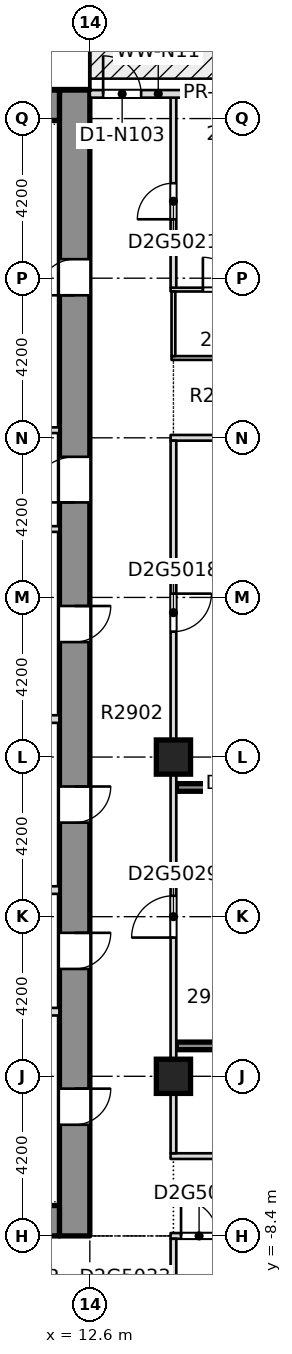
"""IFC4 building model, lengths in metres.
Left out: names, types, materials, properties, quantities, classifications, styles, units other than length and angle.
Written with IfcOpenShell. Run it as: python <this file> out.ifc"""

import sys

from ifc_helpers import new_model, si_unit, direction, frame, frame_2d, origin, origin_2d, place, context, subcontext, project, spatial, rectangle, extrude, element, fill, save


model = new_model("IFC4")
c1 = context("Model", 3, precision=1e-05, world=origin(), true_north=direction((0.0, 1.0)))
c2 = subcontext(c1, "Body", "Model", "MODEL_VIEW")
j1 = project(units=[si_unit("LENGTHUNIT", "METRE"), si_unit("PLANEANGLEUNIT", "RADIAN")], contexts=[c1])
p1 = place(None, origin())
s1 = spatial("IfcSite", under=j1, at=p1, CompositionType="ELEMENT")
p2 = place(p1, origin())
s2 = spatial("IfcBuilding", under=s1, at=p2, CompositionType="ELEMENT")
p3 = place(p2, frame((0.0, 0.0, 114.9)))
s3 = spatial("IfcBuildingStorey", under=s2, at=p3, CompositionType="ELEMENT", Elevation=114.9)
p4 = place(p3, frame((12.2, -8.4, -0.32), z_axis=(0.0, 0.0, 1.0), x_axis=(0.0, 1.0, 0.0)))
e1 = element("IfcWall", 1, at=p4, inside=s3, PredefinedType="SHEAR", context=c2, shape_type="SweptSolid", body=[
    extrude(rectangle(XDim=30.15, YDim=0.8, at=frame_2d((15.075, 0.0))), origin(), (0.0, 0.0, 1.0), 3.45),
])
p5 = place(p4, frame((2.925, 0.0, 0.32)))
e2 = element("IfcOpeningElement", 2, at=p5, cuts=e1, PredefinedType="OPENING", context=c2, shape_type="SweptSolid", body=[
    extrude(rectangle(XDim=0.95, YDim=2.1, at=frame_2d((0.475, 1.05))), frame((0.0, 0.41, 0.0), z_axis=(0.0, -1.0, 0.0), x_axis=(1.0, 0.0, 0.0)), (0.0, 0.0, 1.0), 0.82),
])
p6 = place(p4, frame((7.025, 0.0, 0.32)))
e3 = element("IfcOpeningElement", 3, at=p6, cuts=e1, PredefinedType="OPENING", context=c2, shape_type="SweptSolid", body=[
    extrude(rectangle(XDim=0.95, YDim=2.1, at=frame_2d((0.475, 1.05))), frame((0.0, 0.41, 0.0), z_axis=(0.0, -1.0, 0.0), x_axis=(1.0, 0.0, 0.0)), (0.0, 0.0, 1.0), 0.82),
])
p7 = place(p4, frame((10.875, 0.0, 0.32)))
e4 = element("IfcOpeningElement", 4, at=p7, cuts=e1, PredefinedType="OPENING", context=c2, shape_type="SweptSolid", body=[
    extrude(rectangle(XDim=0.95, YDim=2.1, at=frame_2d((0.475, 1.05))), frame((0.0, 0.41, 0.0), z_axis=(0.0, -1.0, 0.0), x_axis=(1.0, 0.0, 0.0)), (0.0, 0.0, 1.0), 0.82),
])
p8 = place(p4, frame((15.625, 0.0, 0.32)))
e5 = element("IfcOpeningElement", 5, at=p8, cuts=e1, PredefinedType="OPENING", context=c2, shape_type="SweptSolid", body=[
    extrude(rectangle(XDim=0.95, YDim=2.1, at=frame_2d((0.475, 1.05))), frame((0.0, 0.41, 0.0), z_axis=(0.0, -1.0, 0.0), x_axis=(1.0, 0.0, 0.0)), (0.0, 0.0, 1.0), 0.82),
])
p9 = place(p4, frame((24.75, 0.0, 0.32)))
e6 = element("IfcOpeningElement", 6, at=p9, cuts=e1, PredefinedType="OPENING", context=c2, shape_type="SweptSolid", body=[
    extrude(rectangle(XDim=0.95, YDim=2.1, at=frame_2d((0.475, 1.05))), frame((0.0, 0.41, 0.0), z_axis=(0.0, -1.0, 0.0), x_axis=(1.0, 0.0, 0.0)), (0.0, 0.0, 1.0), 0.82),
])
p10 = place(p4, frame((19.3, 0.0, 0.32)))
e7 = element("IfcOpeningElement", 7, at=p10, cuts=e1, PredefinedType="OPENING", context=c2, shape_type="SweptSolid", body=[
    extrude(rectangle(XDim=1.2, YDim=2.1, at=frame_2d((0.6, 1.05))), frame((0.0, 0.41, 0.0), z_axis=(0.0, -1.0, 0.0), x_axis=(1.0, 0.0, 0.0)), (0.0, 0.0, 1.0), 0.82),
])
p11 = place(p3, frame((-11.8, -8.0, -0.32), z_axis=(0.0, 0.0, 1.0), x_axis=(1.0, 0.0, 0.0)))
e8 = element("IfcWall", 8, at=p11, inside=s3, PredefinedType="SHEAR", context=c2, shape_type="SweptSolid", body=[
    extrude(rectangle(XDim=23.6, YDim=0.8, at=frame_2d((11.8, 0.0))), origin(), (0.0, 0.0, 1.0), 3.45),
])
p12 = place(p11, frame((7.05, 0.0, 0.32)))
e9 = element("IfcOpeningElement", 9, at=p12, cuts=e8, PredefinedType="OPENING", context=c2, shape_type="SweptSolid", body=[
    extrude(rectangle(XDim=1.8, YDim=2.1, at=frame_2d((0.9, 1.05))), frame((0.0, 0.41, 0.0), z_axis=(0.0, -1.0, 0.0), x_axis=(1.0, 0.0, 0.0)), (0.0, 0.0, 1.0), 0.82),
])
p13 = place(p11, frame((14.75, 0.0, 0.32)))
e10 = element("IfcOpeningElement", 10, at=p13, cuts=e8, PredefinedType="OPENING", context=c2, shape_type="SweptSolid", body=[
    extrude(rectangle(XDim=1.8, YDim=2.1, at=frame_2d((0.9, 1.05))), frame((0.0, 0.41, 0.0), z_axis=(0.0, -1.0, 0.0), x_axis=(1.0, 0.0, 0.0)), (0.0, 0.0, 1.0), 0.82),
])
p14 = place(p3, frame((-11.8, 21.35, -0.32), z_axis=(0.0, 0.0, 1.0), x_axis=(1.0, 0.0, 0.0)))
e11 = element("IfcWall", 11, at=p14, inside=s3, PredefinedType="SHEAR", context=c2, shape_type="SweptSolid", body=[
    extrude(rectangle(XDim=23.6, YDim=0.8, at=frame_2d((11.8, 0.0))), origin(), (0.0, 0.0, 1.0), 3.45),
])
for number, where, z_axis, x_axis in (
    (12, (14.8, -4.2, -0.32), (0.0, 0.0, 1.0), (1.0, 0.0, 0.0)),
    (13, (14.8, 4.2, -0.32), (0.0, 0.0, 1.0), (1.0, 0.0, 0.0)),
):
    element("IfcColumn", number, at=place(p3, frame(where, z_axis=z_axis, x_axis=x_axis)), inside=s3, PredefinedType="COLUMN", context=c2, shape_type="SweptSolid", body=[
        extrude(rectangle(XDim=0.9, YDim=0.9, at=origin_2d()), origin(), (0.0, 0.0, 1.0), 3.45),
    ])
p15 = place(p3, frame((14.725, -8.4, 0.0), z_axis=(0.0, 0.0, 1.0), x_axis=(1.0, 0.0, 0.0)))
e14 = element("IfcWall", 14, at=p15, inside=s3, PredefinedType="PARTITIONING", context=c2, shape_type="SweptSolid", body=[
    extrude(rectangle(XDim=11.025, YDim=0.15, at=frame_2d((5.512, 0.0))), origin(), (0.0, 0.0, 1.0), 3.13),
])
p16 = place(p15, frame((0.275, 0.0, 0.0)))
e15 = element("IfcOpeningElement", 15, at=p16, cuts=e14, PredefinedType="OPENING", context=c2, shape_type="SweptSolid", body=[
    extrude(rectangle(XDim=0.95, YDim=2.1, at=frame_2d((0.475, 1.05))), frame((0.0, 0.085, 0.0), z_axis=(0.0, -1.0, 0.0), x_axis=(1.0, 0.0, 0.0)), (0.0, 0.0, 1.0), 0.17),
])
p17 = place(p3, frame((14.725, -6.3, 0.0), z_axis=(0.0, 0.0, 1.0), x_axis=(1.0, 0.0, 0.0)))
e16 = element("IfcWall", 16, at=p17, inside=s3, PredefinedType="PARTITIONING", context=c2, shape_type="SweptSolid", body=[
    extrude(rectangle(XDim=11.025, YDim=0.15, at=frame_2d((5.512, 0.0))), origin(), (0.0, 0.0, 1.0), 3.13),
])
p18 = place(p17, frame((5.15, 0.0, 0.0)))
e17 = element("IfcOpeningElement", 17, at=p18, cuts=e16, PredefinedType="OPENING", context=c2, shape_type="SweptSolid", body=[
    extrude(rectangle(XDim=1.0, YDim=2.1, at=frame_2d((0.5, 1.05))), frame((0.0, 0.085, 0.0), z_axis=(0.0, -1.0, 0.0), x_axis=(1.0, 0.0, 0.0)), (0.0, 0.0, 1.0), 0.17),
])
p19 = place(p3, frame((14.875, 3.4, 0.0), z_axis=(0.0, 0.0, 1.0), x_axis=(1.0, 0.0, 0.0)))
e18 = element("IfcWall", 18, at=p19, inside=s3, PredefinedType="SOLIDWALL", context=c2, shape_type="SweptSolid", body=[
    extrude(rectangle(XDim=5.575, YDim=0.2, at=frame_2d((2.788, 0.0))), origin(), (0.0, 0.0, 1.0), 3.13),
])
p20 = place(p3, frame((14.725, 12.6, 0.0), z_axis=(0.0, 0.0, 1.0), x_axis=(1.0, 0.0, 0.0)))
e19 = element("IfcWall", 19, at=p20, inside=s3, PredefinedType="PARTITIONING", context=c2, shape_type="SweptSolid", body=[
    extrude(rectangle(XDim=2.675, YDim=0.15, at=frame_2d((1.337, 0.0))), origin(), (0.0, 0.0, 1.0), 3.13),
])
p21 = place(p3, frame((14.75, 14.7, 0.0), z_axis=(0.0, 0.0, 1.0), x_axis=(1.0, 0.0, 0.0)))
e20 = element("IfcWall", 20, at=p21, inside=s3, PredefinedType="PARTITIONING", context=c2, shape_type="SweptSolid", body=[
    extrude(rectangle(XDim=2.5, YDim=0.1, at=frame_2d((1.25, 0.0))), origin(), (0.0, 0.0, 1.0), 3.13),
])
p22 = place(p3, frame((14.725, 16.5, 0.0), z_axis=(0.0, 0.0, 1.0), x_axis=(1.0, 0.0, 0.0)))
e21 = element("IfcWall", 21, at=p22, inside=s3, PredefinedType="PARTITIONING", context=c2, shape_type="SweptSolid", body=[
    extrude(rectangle(XDim=2.525, YDim=0.1, at=frame_2d((1.262, 0.0))), origin(), (0.0, 0.0, 1.0), 3.13),
])
p23 = place(p22, frame((0.85, 0.0, 0.0)))
e22 = element("IfcOpeningElement", 22, at=p23, cuts=e21, PredefinedType="OPENING", context=c2, shape_type="SweptSolid", body=[
    extrude(rectangle(XDim=0.85, YDim=2.1, at=frame_2d((0.425, 1.05))), frame((0.0, 0.06, 0.0), z_axis=(0.0, -1.0, 0.0), x_axis=(1.0, 0.0, 0.0)), (0.0, 0.0, 1.0), 0.12),
])
p24 = place(p3, frame((14.8, -10.525, 0.0), z_axis=(0.0, 0.0, 1.0), x_axis=(0.0, 1.0, 0.0)))
e23 = element("IfcWall", 23, at=p24, inside=s3, PredefinedType="PARTITIONING", context=c2, shape_type="SweptSolid", body=[
    extrude(rectangle(XDim=2.05, YDim=0.15, at=frame_2d((1.025, 0.0))), origin(), (0.0, 0.0, 1.0), 3.13),
])
p25 = place(p3, frame((14.8, -6.225, 0.0), z_axis=(0.0, 0.0, 1.0), x_axis=(0.0, 1.0, 0.0)))
e24 = element("IfcWall", 24, at=p25, inside=s3, PredefinedType="PARTITIONING", context=c2, shape_type="SweptSolid", body=[
    extrude(rectangle(XDim=18.75, YDim=0.15, at=frame_2d((9.375, 0.0))), origin(), (0.0, 0.0, 1.0), 3.13),
])
p26 = place(p25, frame((13.725, 0.0, 0.0)))
e25 = element("IfcOpeningElement", 25, at=p26, cuts=e24, PredefinedType="OPENING", context=c2, shape_type="SweptSolid", body=[
    extrude(rectangle(XDim=1.0, YDim=2.1, at=frame_2d((0.5, 1.05))), frame((0.0, 0.085, 0.0), z_axis=(0.0, -1.0, 0.0), x_axis=(1.0, 0.0, 0.0)), (0.0, 0.0, 1.0), 0.17),
])
p27 = place(p25, frame((5.675, 0.0, 0.0)))
e26 = element("IfcOpeningElement", 26, at=p27, cuts=e24, PredefinedType="OPENING", context=c2, shape_type="SweptSolid", body=[
    extrude(rectangle(XDim=1.1, YDim=2.1, at=frame_2d((0.55, 1.05))), frame((0.0, 0.085, 0.0), z_axis=(0.0, -1.0, 0.0), x_axis=(1.0, 0.0, 0.0)), (0.0, 0.0, 1.0), 0.17),
])
p28 = place(p3, frame((14.8, 14.75, 0.0), z_axis=(0.0, 0.0, 1.0), x_axis=(0.0, 1.0, 0.0)))
e27 = element("IfcWall", 27, at=p28, inside=s3, PredefinedType="PARTITIONING", context=c2, shape_type="SweptSolid", body=[
    extrude(rectangle(XDim=1.7, YDim=0.1, at=frame_2d((0.85, 0.0))), origin(), (0.0, 0.0, 1.0), 3.13),
])
p29 = place(p3, frame((14.8, 16.55, 0.0), z_axis=(0.0, 0.0, 1.0), x_axis=(0.0, 1.0, 0.0)))
e28 = element("IfcWall", 28, at=p29, inside=s3, PredefinedType="PARTITIONING", context=c2, shape_type="SweptSolid", body=[
    extrude(rectangle(XDim=5.0, YDim=0.15, at=frame_2d((2.5, 0.0))), origin(), (0.0, 0.0, 1.0), 3.13),
])
p30 = place(p29, frame((1.8, 0.0, 0.0)))
e29 = element("IfcOpeningElement", 29, at=p30, cuts=e28, PredefinedType="OPENING", context=c2, shape_type="SweptSolid", body=[
    extrude(rectangle(XDim=0.95, YDim=2.1, at=frame_2d((0.475, 1.05))), frame((0.0, 0.085, 0.0), z_axis=(0.0, -1.0, 0.0), x_axis=(1.0, 0.0, 0.0)), (0.0, 0.0, 1.0), 0.17),
])
p31 = place(p3, frame((16.2, 21.65, 0.0), z_axis=(0.0, 0.0, 1.0), x_axis=(-1.0, 0.0, 0.0)))
e30 = element("IfcWall", 30, at=p31, inside=s3, PredefinedType="STANDARD", context=c2, shape_type="SweptSolid", body=[
    extrude(rectangle(XDim=3.6, YDim=0.2, at=frame_2d((1.8, 0.0))), origin(), (0.0, 0.0, 1.0), 3.13),
])
p32 = place(p31, frame((2.25, 0.0, 0.0)))
e31 = element("IfcOpeningElement", 31, at=p32, cuts=e30, PredefinedType="OPENING", context=c2, shape_type="SweptSolid", body=[
    extrude(rectangle(XDim=1.0, YDim=2.4, at=frame_2d((0.5, 1.2))), frame((0.0, 0.11, 0.0), z_axis=(0.0, -1.0, 0.0), x_axis=(1.0, 0.0, 0.0)), (0.0, 0.0, 1.0), 0.22),
])
for number, where, z_axis, x_axis in (
    (32, (8.801, -2.5, 0.0), (0.0, 0.0, 1.0), (1.0, 0.0, 0.0)),
    (33, (8.801, 0.7, 0.0), (0.0, 0.0, 1.0), (1.0, 0.0, 0.0)),
    (34, (8.801, 5.2, 0.0), (0.0, 0.0, 1.0), (1.0, 0.0, 0.0)),
):
    element("IfcWall", number, at=place(p3, frame(where, z_axis=z_axis, x_axis=x_axis)), inside=s3, PredefinedType="PARTITIONING", context=c2, shape_type="SweptSolid", body=[
        extrude(rectangle(XDim=2.998, YDim=0.2, at=frame_2d((1.499, 0.0))), origin(), (0.0, 0.0, 1.0), 3.13),
    ])
for number, where, z_axis, x_axis in (
    (35, (8.801, 10.2, 0.0), (0.0, 0.0, 1.0), (1.0, 0.0, 0.0)),
    (36, (8.801, 12.8, 0.0), (0.0, 0.0, 1.0), (1.0, 0.0, 0.0)),
):
    element("IfcWall", number, at=place(p3, frame(where, z_axis=z_axis, x_axis=x_axis)), inside=s3, PredefinedType="PARTITIONING", context=c2, shape_type="SweptSolid", body=[
        extrude(rectangle(XDim=2.998, YDim=0.15, at=frame_2d((1.499, 0.0))), origin(), (0.0, 0.0, 1.0), 3.13),
    ])
p33 = place(p3, frame((14.875, -3.4, 0.0), z_axis=(0.0, 0.0, 1.0), x_axis=(1.0, 0.0, 0.0)))
e37 = element("IfcWall", 37, at=p33, inside=s3, PredefinedType="SOLIDWALL", context=c2, shape_type="SweptSolid", body=[
    extrude(rectangle(XDim=5.525, YDim=0.2, at=frame_2d((2.762, 0.0))), origin(), (0.0, 0.0, 1.0), 3.13),
])
p34 = place(p16, origin())
e38 = element("IfcDoor", 38, at=p34, inside=s3, OperationType="SINGLE_SWING_RIGHT", PredefinedType="DOOR", context=c2, shape_type="SweptSolid", body=[
    extrude(rectangle(XDim=0.95, YDim=2.1, at=frame_2d((0.475, 1.05))), frame((0.0, 0.025, 0.0), z_axis=(0.0, -1.0, 0.0), x_axis=(1.0, 0.0, 0.0)), (0.0, 0.0, 1.0), 0.05),
])
fill(e15, e38)
p35 = place(p26, origin())
e39 = element("IfcDoor", 39, at=p35, inside=s3, OperationType="SINGLE_SWING_RIGHT", PredefinedType="DOOR", context=c2, shape_type="SweptSolid", body=[
    extrude(rectangle(XDim=1.0, YDim=2.1, at=frame_2d((0.5, 1.05))), frame((0.0, 0.025, 0.0), z_axis=(0.0, -1.0, 0.0), x_axis=(1.0, 0.0, 0.0)), (0.0, 0.0, 1.0), 0.05),
])
fill(e25, e39)
p36 = place(p30, origin())
e40 = element("IfcDoor", 40, at=p36, inside=s3, OperationType="SINGLE_SWING_LEFT", PredefinedType="DOOR", context=c2, shape_type="SweptSolid", body=[
    extrude(rectangle(XDim=0.95, YDim=2.1, at=frame_2d((0.475, 1.05))), frame((0.0, 0.025, 0.0), z_axis=(0.0, -1.0, 0.0), x_axis=(1.0, 0.0, 0.0)), (0.0, 0.0, 1.0), 0.05),
])
fill(e29, e40)
p37 = place(p23, origin())
e41 = element("IfcDoor", 41, at=p37, inside=s3, OperationType="SINGLE_SWING_RIGHT", PredefinedType="DOOR", context=c2, shape_type="SweptSolid", body=[
    extrude(rectangle(XDim=0.85, YDim=2.1, at=frame_2d((0.425, 1.05))), frame((0.0, 0.025, 0.0), z_axis=(0.0, -1.0, 0.0), x_axis=(1.0, 0.0, 0.0)), (0.0, 0.0, 1.0), 0.05),
])
fill(e22, e41)
p38 = place(p27, origin())
e42 = element("IfcDoor", 42, at=p38, inside=s3, OperationType="SINGLE_SWING_LEFT", PredefinedType="DOOR", context=c2, shape_type="SweptSolid", body=[
    extrude(rectangle(XDim=1.1, YDim=2.1, at=frame_2d((0.55, 1.05))), frame((0.0, 0.025, 0.0), z_axis=(0.0, -1.0, 0.0), x_axis=(1.0, 0.0, 0.0)), (0.0, 0.0, 1.0), 0.05),
])
fill(e26, e42)
p39 = place(p32, origin())
e43 = element("IfcDoor", 43, at=p39, inside=s3, OperationType="SINGLE_SWING_LEFT", PredefinedType="DOOR", context=c2, shape_type="SweptSolid", body=[
    extrude(rectangle(XDim=1.0, YDim=2.4, at=frame_2d((0.5, 1.2))), frame((0.0, 0.025, 0.0), z_axis=(0.0, -1.0, 0.0), x_axis=(1.0, 0.0, 0.0)), (0.0, 0.0, 1.0), 0.05),
])
fill(e31, e43)
p40 = place(p5, origin())
e44 = element("IfcDoor", 44, at=p40, inside=s3, OperationType="SINGLE_SWING_LEFT", PredefinedType="DOOR", context=c2, shape_type="SweptSolid", body=[
    extrude(rectangle(XDim=0.95, YDim=2.1, at=frame_2d((0.475, 1.05))), frame((0.0, 0.025, 0.0), z_axis=(0.0, -1.0, 0.0), x_axis=(1.0, 0.0, 0.0)), (0.0, 0.0, 1.0), 0.05),
])
fill(e2, e44)
p41 = place(p6, origin())
e45 = element("IfcDoor", 45, at=p41, inside=s3, OperationType="SINGLE_SWING_LEFT", PredefinedType="DOOR", context=c2, shape_type="SweptSolid", body=[
    extrude(rectangle(XDim=0.95, YDim=2.1, at=frame_2d((0.475, 1.05))), frame((0.0, 0.025, 0.0), z_axis=(0.0, -1.0, 0.0), x_axis=(1.0, 0.0, 0.0)), (0.0, 0.0, 1.0), 0.05),
])
fill(e3, e45)
p42 = place(p7, origin())
e46 = element("IfcDoor", 46, at=p42, inside=s3, OperationType="SINGLE_SWING_LEFT", PredefinedType="DOOR", context=c2, shape_type="SweptSolid", body=[
    extrude(rectangle(XDim=0.95, YDim=2.1, at=frame_2d((0.475, 1.05))), frame((0.0, 0.025, 0.0), z_axis=(0.0, -1.0, 0.0), x_axis=(1.0, 0.0, 0.0)), (0.0, 0.0, 1.0), 0.05),
])
fill(e4, e46)
p43 = place(p8, origin())
e47 = element("IfcDoor", 47, at=p43, inside=s3, OperationType="SINGLE_SWING_LEFT", PredefinedType="DOOR", context=c2, shape_type="SweptSolid", body=[
    extrude(rectangle(XDim=0.95, YDim=2.1, at=frame_2d((0.475, 1.05))), frame((0.0, 0.025, 0.0), z_axis=(0.0, -1.0, 0.0), x_axis=(1.0, 0.0, 0.0)), (0.0, 0.0, 1.0), 0.05),
])
fill(e5, e47)
p44 = place(p9, origin())
e48 = element("IfcDoor", 48, at=p44, inside=s3, OperationType="SINGLE_SWING_LEFT", PredefinedType="DOOR", context=c2, shape_type="SweptSolid", body=[
    extrude(rectangle(XDim=0.95, YDim=2.1, at=frame_2d((0.475, 1.05))), frame((0.0, 0.025, 0.0), z_axis=(0.0, -1.0, 0.0), x_axis=(1.0, 0.0, 0.0)), (0.0, 0.0, 1.0), 0.05),
])
fill(e6, e48)
p45 = place(p10, origin())
e49 = element("IfcDoor", 49, at=p45, inside=s3, OperationType="SINGLE_SWING_LEFT", PredefinedType="DOOR", context=c2, shape_type="SweptSolid", body=[
    extrude(rectangle(XDim=1.2, YDim=2.1, at=frame_2d((0.6, 1.05))), frame((0.0, 0.025, 0.0), z_axis=(0.0, -1.0, 0.0), x_axis=(1.0, 0.0, 0.0)), (0.0, 0.0, 1.0), 0.05),
])
fill(e7, e49)
save(model, sys.argv[1])
